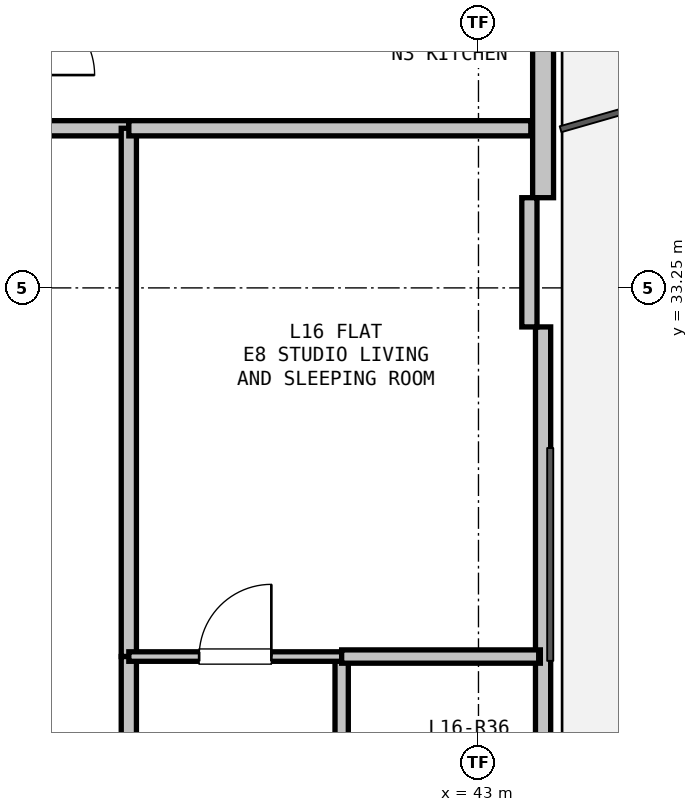
"""IFC4 building model, lengths in metres.
Left out: names, types, materials, properties, quantities, classifications, styles, units other than length and angle.
Written with IfcOpenShell. Run it as: python <this file> out.ifc"""

import sys

from ifc_helpers import new_model, si_unit, direction, frame, frame_2d, origin, place, context, subcontext, project, spatial, rectangle, extrude, element, fill, save


model = new_model("IFC4")
c1 = context("Model", 3, precision=1e-05, world=origin(), true_north=direction((0.0, 1.0)))
c2 = subcontext(c1, "Body", "Model", "MODEL_VIEW")
j1 = project(units=[si_unit("LENGTHUNIT", "METRE"), si_unit("PLANEANGLEUNIT", "RADIAN")], contexts=[c1])
p1 = place(None, origin())
s1 = spatial("IfcSite", under=j1, at=p1, CompositionType="ELEMENT")
p2 = place(p1, origin())
s2 = spatial("IfcBuilding", under=s1, at=p2, CompositionType="ELEMENT")
p3 = place(p2, frame((0.0, 0.0, 58.8)))
s3 = spatial("IfcBuildingStorey", under=s2, at=p3, CompositionType="ELEMENT", Elevation=58.8)
p4 = place(p3, frame((43.85, 47.11, 0.0), z_axis=(0.0, 0.0, 1.0), x_axis=(0.0, -1.0, 0.0)))
e1 = element("IfcWall", 1, at=p4, inside=s3, PredefinedType="SOLIDWALL", context=c2, shape_type="SweptSolid", body=[
    extrude(rectangle(XDim=12.673, YDim=0.275, at=frame_2d((6.336, 0.0))), origin(), (0.0, 0.0, 1.0), 2.64),
])
p5 = place(p4, frame((2.325, 0.0, 0.0)))
e2 = element("IfcOpeningElement", 2, at=p5, cuts=e1, PredefinedType="OPENING", context=c2, shape_type="SweptSolid", body=[
    extrude(rectangle(XDim=1.0, YDim=2.1, at=frame_2d((0.5, 1.05))), frame((0.0, 0.147, 0.0), z_axis=(0.0, -1.0, 0.0), x_axis=(1.0, 0.0, 0.0)), (0.0, 0.0, 1.0), 0.295),
])
p6 = place(p3, frame((43.85, 32.737, 0.0), z_axis=(0.0, 0.0, 1.0), x_axis=(0.0, -1.0, 0.0)))
e3 = element("IfcWall", 3, at=p6, inside=s3, PredefinedType="PARAPET", context=c2, shape_type="SweptSolid", body=[
    extrude(rectangle(XDim=11.973, YDim=0.2, at=frame_2d((5.987, 0.0))), origin(), (0.0, 0.0, 1.0), 0.2),
])
p7 = place(p3, frame((43.67, 34.437, 0.0), z_axis=(0.0, 0.0, 1.0), x_axis=(0.0, -1.0, 0.0)))
e4 = element("IfcWall", 4, at=p7, inside=s3, PredefinedType="PARAPET", context=c2, shape_type="SweptSolid", body=[
    extrude(rectangle(XDim=1.7, YDim=0.2, at=frame_2d((0.85, 0.0))), origin(), (0.0, 0.0, 1.0), 2.64),
])
p8 = place(p3, frame((37.0, 35.35, 0.0), z_axis=(0.0, 0.0, 1.0), x_axis=(1.0, 0.0, 0.0)))
e5 = element("IfcWall", 5, at=p8, inside=s3, PredefinedType="PARTITIONING", context=c2, shape_type="SweptSolid", body=[
    extrude(rectangle(XDim=1.4, YDim=0.2, at=frame_2d((0.7, 0.0))), origin(), (0.0, 0.0, 1.0), 2.317),
])
p9 = place(p3, frame((38.4, 35.35, 0.0), z_axis=(0.0, 0.0, 1.0), x_axis=(0.0, -1.0, 0.0)))
e6 = element("IfcWall", 6, at=p9, inside=s3, PredefinedType="PARTITIONING", context=c2, shape_type="SweptSolid", body=[
    extrude(rectangle(XDim=6.95, YDim=0.2, at=frame_2d((3.475, 0.0))), origin(), (0.0, 0.0, 1.0), 2.317),
])
p10 = place(p3, frame((38.4, 28.4, 0.0), z_axis=(0.0, 0.0, 1.0), x_axis=(0.0, -1.0, 0.0)))
e7 = element("IfcWall", 7, at=p10, inside=s3, PredefinedType="PARTITIONING", context=c2, shape_type="SweptSolid", body=[
    extrude(rectangle(XDim=3.2, YDim=0.2, at=frame_2d((1.6, 0.0))), origin(), (0.0, 0.0, 1.0), 3.02),
])
p11 = place(p10, frame((1.1, 0.0, 0.0)))
e8 = element("IfcOpeningElement", 8, at=p11, cuts=e7, PredefinedType="OPENING", context=c2, shape_type="SweptSolid", body=[
    extrude(rectangle(XDim=1.0, YDim=2.15, at=frame_2d((0.5, 1.075))), frame((0.0, 0.11, 0.0), z_axis=(0.0, -1.0, 0.0), x_axis=(1.0, 0.0, 0.0)), (0.0, 0.0, 1.0), 0.22),
])
p12 = place(p3, frame((41.2, 28.4, 0.0), z_axis=(0.0, 0.0, 1.0), x_axis=(0.0, -1.0, 0.0)))
e9 = element("IfcWall", 9, at=p12, inside=s3, PredefinedType="PLUMBINGWALL", context=c2, shape_type="SweptSolid", body=[
    extrude(rectangle(XDim=3.2, YDim=0.175, at=frame_2d((1.6, 0.0))), origin(), (0.0, 0.0, 1.0), 3.02),
])
p13 = place(p12, frame((1.15, 0.0, 0.0)))
e10 = element("IfcOpeningElement", 10, at=p13, cuts=e9, PredefinedType="OPENING", context=c2, shape_type="SweptSolid", body=[
    extrude(rectangle(XDim=0.9, YDim=2.1, at=frame_2d((0.45, 1.05))), frame((0.0, 0.097, 0.0), z_axis=(0.0, -1.0, 0.0), x_axis=(1.0, 0.0, 0.0)), (0.0, 0.0, 1.0), 0.195),
])
p14 = place(p3, frame((38.4, 28.4, 0.0), z_axis=(0.0, 0.0, 1.0), x_axis=(1.0, 0.0, 0.0)))
e11 = element("IfcWall", 11, at=p14, inside=s3, PredefinedType="PARTITIONING", context=c2, shape_type="SweptSolid", body=[
    extrude(rectangle(XDim=2.8, YDim=0.125, at=frame_2d((1.4, 0.0))), origin(), (0.0, 0.0, 1.0), 3.02),
])
p15 = place(p14, frame((0.925, 0.0, 0.0)))
e12 = element("IfcOpeningElement", 12, at=p15, cuts=e11, PredefinedType="OPENING", context=c2, shape_type="SweptSolid", body=[
    extrude(rectangle(XDim=0.95, YDim=2.1, at=frame_2d((0.475, 1.05))), frame((0.0, 0.073, 0.0), z_axis=(0.0, -1.0, 0.0), x_axis=(1.0, 0.0, 0.0)), (0.0, 0.0, 1.0), 0.145),
])
p16 = place(p3, frame((43.688, 35.35, 0.0), z_axis=(0.0, 0.0, 1.0), x_axis=(-1.0, 0.0, 0.0)))
e13 = element("IfcWall", 13, at=p16, inside=s3, PredefinedType="PARTITIONING", context=c2, shape_type="SweptSolid", body=[
    extrude(rectangle(XDim=5.289, YDim=0.2, at=frame_2d((2.644, 0.0))), origin(), (0.0, 0.0, 1.0), 2.317),
])
p17 = place(p3, frame((41.2, 28.4, 0.0), z_axis=(0.0, 0.0, 1.0), x_axis=(1.0, 0.0, 0.0)))
e14 = element("IfcWall", 14, at=p17, inside=s3, PredefinedType="PLUMBINGWALL", context=c2, shape_type="SweptSolid", body=[
    extrude(rectangle(XDim=2.614, YDim=0.175, at=frame_2d((1.307, 0.0))), origin(), (0.0, 0.0, 1.0), 2.365),
])
p18 = place(p15, origin())
e15 = element("IfcDoor", 15, at=p18, inside=s3, OperationType="SINGLE_SWING_RIGHT", PredefinedType="DOOR", context=c2, shape_type="SweptSolid", body=[
    extrude(rectangle(XDim=0.95, YDim=2.1, at=frame_2d((0.475, 1.05))), frame((0.0, 0.025, 0.0), z_axis=(0.0, -1.0, 0.0), x_axis=(1.0, 0.0, 0.0)), (0.0, 0.0, 1.0), 0.05),
])
fill(e12, e15)
save(model, sys.argv[1])
